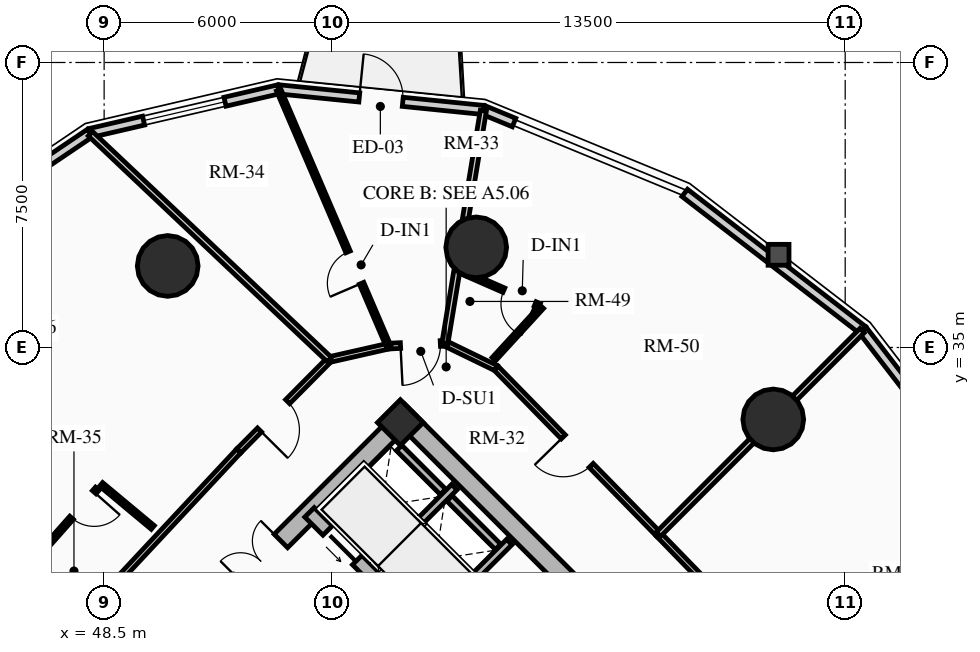
"""IFC4 building model, lengths in metres.
Left out: names, types, materials, properties, quantities, classifications, styles, units other than length and angle.
Written with IfcOpenShell. Run it as: python <this file> out.ifc"""

import sys

from ifc_helpers import new_model, si_unit, direction, frame, frame_2d, origin, origin_2d, place, context, subcontext, project, spatial, rectangle, circle, extrude, source, transform, mapped, element, fill, save


model = new_model("IFC4")
c1 = context("Model", 3, precision=1e-05, world=origin(), true_north=direction((0.0, 1.0)))
c2 = subcontext(c1, "Body", "Model", "MODEL_VIEW")
j1 = project(units=[si_unit("LENGTHUNIT", "METRE"), si_unit("PLANEANGLEUNIT", "RADIAN")], contexts=[c1])
p1 = place(None, origin())
s1 = spatial("IfcSite", under=j1, at=p1, CompositionType="ELEMENT")
p2 = place(p1, origin())
s2 = spatial("IfcBuilding", under=s1, at=p2, CompositionType="ELEMENT")
p3 = place(p2, frame((0.0, 0.0, 33.64)))
s3 = spatial("IfcBuildingStorey", under=s2, at=p3, CompositionType="ELEMENT", Elevation=33.64)
p4 = place(p3, frame((66.339, 23.227, 0.0), z_axis=(0.0, 0.0, 1.0), x_axis=(-0.707106781187, 0.707106781187, 0.0)))
e1 = element("IfcWall", 1, at=p4, inside=s3, PredefinedType="SHEAR", context=c2, shape_type="SweptSolid", body=[
    extrude(rectangle(XDim=14.3, YDim=0.5, at=frame_2d((7.15, 0.0))), origin(), (0.0, 0.0, 1.0), 2.91),
])
p5 = place(p3, frame((48.838, 25.596, 0.0), z_axis=(0.0, 0.0, 1.0), x_axis=(0.707106781187, 0.707106781187, 0.0)))
e2 = element("IfcWall", 2, at=p5, inside=s3, PredefinedType="SHEAR", context=c2, shape_type="SweptSolid", body=[
    extrude(rectangle(XDim=10.7, YDim=0.5, at=frame_2d((5.35, 0.0))), origin(), (0.0, 0.0, 1.0), 2.91),
])
m1 = source(origin(), c2, "Body", "SweptSolid", [
    extrude(rectangle(XDim=1.5, YDim=2.02, at=frame_2d((0.75, 1.01))), frame((0.0, 0.26, 0.0), z_axis=(0.0, -1.0, 0.0), x_axis=(1.0, 0.0, 0.0)), (0.0, 0.0, 1.0), 0.52),
])
p6 = place(p5, frame((4.6, 0.0, 0.0)))
e3 = element("IfcOpeningElement", 3, at=p6, cuts=e2, PredefinedType="OPENING", context=c2, shape_type="MappedRepresentation", body=[
    mapped(m1, transform((0.0, 0.0, 0.0), x_axis=(1.0, 0.0, 0.0), y_axis=(0.0, 1.0, 0.0), z_axis=(0.0, 0.0, 1.0), scale=1.0)),
])
p7 = place(p3, frame((63.662, 20.904, 0.0), z_axis=(0.0, 0.0, 1.0), x_axis=(-0.707106781187, 0.707106781187, 0.0)))
e4 = element("IfcWall", 4, at=p7, inside=s3, PredefinedType="SHEAR", context=c2, shape_type="SweptSolid", body=[
    extrude(rectangle(XDim=13.8, YDim=0.35, at=frame_2d((6.9, 0.0))), origin(), (0.0, 0.0, 1.0), 2.91),
])
m2 = source(origin(), c2, "Body", "SweptSolid", [
    extrude(rectangle(XDim=1.1, YDim=2.015, at=frame_2d((0.55, 1.007))), frame((0.0, 0.185, 0.0), z_axis=(0.0, -1.0, 0.0), x_axis=(1.0, 0.0, 0.0)), (0.0, 0.0, 1.0), 0.37),
])
p8 = place(p7, frame((10.025, 0.0, 0.0)))
e5 = element("IfcOpeningElement", 5, at=p8, cuts=e4, PredefinedType="OPENING", context=c2, shape_type="MappedRepresentation", body=[
    mapped(m2, transform((0.0, 0.0, 0.0), x_axis=(1.0, 0.0, 0.0), y_axis=(0.0, 1.0, 0.0), z_axis=(0.0, 0.0, 1.0), scale=1.0)),
])
p9 = place(p7, frame((12.025, 0.0, 0.0)))
e6 = element("IfcOpeningElement", 6, at=p9, cuts=e4, PredefinedType="OPENING", context=c2, shape_type="MappedRepresentation", body=[
    mapped(m2, transform((0.0, 0.0, 0.0), x_axis=(1.0, 0.0, 0.0), y_axis=(0.0, 1.0, 0.0), z_axis=(0.0, 0.0, 1.0), scale=1.0)),
])
m3 = source(origin(), c2, "Body", "SweptSolid", [
    extrude(rectangle(XDim=1.15, YDim=2.02, at=frame_2d((0.575, 1.01))), frame((0.0, 0.185, 0.0), z_axis=(0.0, -1.0, 0.0), x_axis=(1.0, 0.0, 0.0)), (0.0, 0.0, 1.0), 0.37),
])
p10 = place(p7, frame((5.33, 0.0, 0.0)))
e7 = element("IfcOpeningElement", 7, at=p10, cuts=e4, PredefinedType="OPENING", context=c2, shape_type="MappedRepresentation", body=[
    mapped(m3, transform((0.0, 0.0, 0.0), x_axis=(1.0, 0.0, 0.0), y_axis=(0.0, 1.0, 0.0), z_axis=(0.0, 0.0, 1.0), scale=1.0)),
])
p11 = place(p3, frame((56.294, 33.024, 0.0), z_axis=(0.0, 0.0, 1.0), x_axis=(0.707106781187, 0.707106781187, 0.0)))
e8 = element("IfcColumn", 8, at=p11, inside=s3, PredefinedType="COLUMN", context=c2, shape_type="SweptSolid", body=[
    extrude(rectangle(XDim=0.85, YDim=0.85, at=origin_2d()), origin(), (0.0, 0.0, 1.0), 2.91),
])
for number, where, z_axis, x_axis in (
    (9, (66.107, 33.107, 0.0), (0.0, 0.0, 1.0), (1.0, 0.0, 0.0)),
    (10, (58.291, 37.635, 0.0), (0.0, 0.0, 1.0), (1.0, 0.0, 0.0)),
    (11, (50.173, 37.146, 0.0), (0.0, 0.0, 1.0), (1.0, 0.0, 0.0)),
):
    element("IfcColumn", number, at=place(p3, frame(where, z_axis=z_axis, x_axis=x_axis)), inside=s3, PredefinedType="USERDEFINED", context=c2, shape_type="SweptSolid", body=[
        extrude(circle(Radius=0.8, at=origin_2d()), origin(), (0.0, 0.0, 1.0), 2.91),
    ])
p12 = place(p3, frame((63.778, 39.068, 0.0), z_axis=(0.0, 0.0, 1.0), x_axis=(0.792020182601, -0.610494906082, 0.0)))
e12 = element("IfcWall", 12, at=p12, inside=s3, PredefinedType="SOLIDWALL", context=c2, shape_type="SweptSolid", body=[
    extrude(rectangle(XDim=5.911, YDim=0.24, at=frame_2d((2.956, 0.0))), origin(), (0.0, 0.0, 1.0), 2.073),
])
p13 = place(p3, frame((58.482, 41.251, 0.0), z_axis=(0.0, 0.0, 1.0), x_axis=(0.924556017656, -0.381046152345, 0.0)))
e13 = element("IfcWall", 13, at=p13, inside=s3, PredefinedType="SOLIDWALL", context=c2, shape_type="SweptSolid", body=[
    extrude(rectangle(XDim=0.87, YDim=0.24, at=frame_2d((0.435, 0.0))), origin(), (0.0, 0.0, 1.0), 2.073),
])
p14 = place(p3, frame((53.09, 41.794, 0.0), z_axis=(0.0, 0.0, 1.0), x_axis=(0.994968263437, -0.100190592135, 0.0)))
e14 = element("IfcWall", 14, at=p14, inside=s3, PredefinedType="SOLIDWALL", context=c2, shape_type="SweptSolid", body=[
    extrude(rectangle(XDim=5.419, YDim=0.24, at=frame_2d((2.71, 0.0))), origin(), (0.0, 0.0, 1.0), 2.073),
])
m4 = source(origin(), c2, "Body", "SweptSolid", [
    extrude(rectangle(XDim=1.15, YDim=2.005, at=frame_2d((0.575, 1.002))), frame((0.0, 0.13, 0.0), z_axis=(0.0, -1.0, 0.0), x_axis=(1.0, 0.0, 0.0)), (0.0, 0.0, 1.0), 0.26),
])
p15 = place(p14, frame((2.135, 0.0, 0.0)))
e15 = element("IfcOpeningElement", 15, at=p15, cuts=e14, PredefinedType="OPENING", context=c2, shape_type="MappedRepresentation", body=[
    mapped(m4, transform((0.0, 0.0, 0.0), x_axis=(1.0, 0.0, 0.0), y_axis=(0.0, 1.0, 0.0), z_axis=(0.0, 0.0, 1.0), scale=1.0)),
])
p16 = place(p3, frame((48.129, 40.644, 0.0), z_axis=(0.0, 0.0, 1.0), x_axis=(0.974167686491, 0.22582585901, 0.0)))
e16 = element("IfcWall", 16, at=p16, inside=s3, PredefinedType="SOLIDWALL", context=c2, shape_type="SweptSolid", body=[
    extrude(rectangle(XDim=5.092, YDim=0.24, at=frame_2d((2.546, 0.0))), origin(), (0.0, 0.0, 1.0), 2.073),
])
m5 = source(origin(), c2, "Body", "SweptSolid", [
    extrude(rectangle(XDim=2.2, YDim=1.35, at=frame_2d((1.1, 0.675))), frame((0.0, 0.13, 0.0), z_axis=(0.0, -1.0, 0.0), x_axis=(1.0, 0.0, 0.0)), (0.0, 0.0, 1.0), 0.26),
])
p17 = place(p16, frame((1.446, 0.0, 0.65)))
e17 = element("IfcOpeningElement", 17, at=p17, cuts=e16, PredefinedType="OPENING", context=c2, shape_type="MappedRepresentation", body=[
    mapped(m5, transform((0.0, 0.0, 0.0), x_axis=(1.0, 0.0, 0.0), y_axis=(0.0, 1.0, 0.0), z_axis=(0.0, 0.0, 1.0), scale=1.0)),
])
p18 = place(p3, frame((44.086, 37.914, 0.0), z_axis=(0.0, 0.0, 1.0), x_axis=(0.828748297084, 0.559621532896, 0.0)))
e18 = element("IfcWall", 18, at=p18, inside=s3, PredefinedType="SOLIDWALL", context=c2, shape_type="SweptSolid", body=[
    extrude(rectangle(XDim=4.879, YDim=0.24, at=frame_2d((2.439, 0.0))), origin(), (0.0, 0.0, 1.0), 2.073),
])
p19 = place(p3, frame((68.459, 35.459, 0.0), z_axis=(0.0, 0.0, 1.0), x_axis=(0.610494906082, -0.792020182601, 0.0)))
e19 = element("IfcWall", 19, at=p19, inside=s3, PredefinedType="SOLIDWALL", context=c2, shape_type="SweptSolid", body=[
    extrude(rectangle(XDim=5.911, YDim=0.24, at=frame_2d((2.956, 0.0))), origin(), (0.0, 0.0, 1.0), 2.073),
])
m6 = source(origin(), c2, "Body", "SweptSolid", [
    extrude(rectangle(XDim=1.9, YDim=1.35, at=frame_2d((0.95, 0.675))), frame((0.0, 0.13, 0.0), z_axis=(0.0, -1.0, 0.0), x_axis=(1.0, 0.0, 0.0)), (0.0, 0.0, 1.0), 0.26),
])
p20 = place(p19, frame((2.005, 0.0, 0.65)))
e20 = element("IfcOpeningElement", 20, at=p20, cuts=e19, PredefinedType="OPENING", context=c2, shape_type="MappedRepresentation", body=[
    mapped(m6, transform((0.0, 0.0, 0.0), x_axis=(1.0, 0.0, 0.0), y_axis=(0.0, 1.0, 0.0), z_axis=(0.0, 0.0, 1.0), scale=1.0)),
])
p21 = place(p3, frame((57.062, 27.781, 0.0), z_axis=(0.0, 0.0, 1.0), x_axis=(0.707106781187, 0.707106781187, 0.0)))
e21 = element("IfcWall", 21, at=p21, inside=s3, PredefinedType="SHEAR", context=c2, shape_type="SweptSolid", body=[
    extrude(rectangle(XDim=2.97, YDim=0.2, at=frame_2d((1.485, 0.0))), origin(), (0.0, 0.0, 1.0), 2.91),
])
p22 = place(p3, frame((55.615, 29.227, 0.0), z_axis=(0.0, 0.0, 1.0), x_axis=(0.707147878904, 0.70706568108, 0.0)))
e22 = element("IfcWall", 22, at=p22, inside=s3, PredefinedType="SHEAR", context=c2, shape_type="SweptSolid", body=[
    extrude(rectangle(XDim=2.97, YDim=0.2, at=frame_2d((1.485, 0.0))), origin(), (0.0, 0.0, 1.0), 2.91),
])
p23 = place(p3, frame((58.865, 29.754, 0.0), z_axis=(0.0, 0.0, 1.0), x_axis=(-0.707174411312, 0.707039144592, 0.0)))
e23 = element("IfcWall", 23, at=p23, inside=s3, PredefinedType="SHEAR", context=c2, shape_type="SweptSolid", body=[
    extrude(rectangle(XDim=1.805, YDim=0.2, at=frame_2d((0.902, 0.0))), origin(), (0.0, 0.0, 1.0), 2.91),
])
p24 = place(p3, frame((57.419, 31.2, 0.0), z_axis=(0.0, 0.0, 1.0), x_axis=(-0.707032117043, 0.707181437447, 0.0)))
e24 = element("IfcWall", 24, at=p24, inside=s3, PredefinedType="SHEAR", context=c2, shape_type="SweptSolid", body=[
    extrude(rectangle(XDim=1.635, YDim=0.2, at=frame_2d((0.817, 0.0))), origin(), (0.0, 0.0, 1.0), 2.91),
])
p25 = place(p3, frame((63.086, 30.086, 0.0), z_axis=(0.0, 0.0, 1.0), x_axis=(-0.699075897379, 0.715047473741, 0.0)))
e25 = element("IfcWall", 25, at=p25, inside=s3, PredefinedType="PARTITIONING", context=c2, shape_type="SweptSolid", body=[
    extrude(rectangle(XDim=6.114, YDim=0.15, at=frame_2d((3.057, 0.0))), origin(), (0.0, 0.0, 1.0), 2.159),
])
m7 = source(origin(), c2, "Body", "SweptSolid", [
    extrude(rectangle(XDim=1.05, YDim=2.015, at=frame_2d((0.525, 1.007))), frame((0.0, 0.085, 0.0), z_axis=(0.0, -1.0, 0.0), x_axis=(1.0, 0.0, 0.0)), (0.0, 0.0, 1.0), 0.17),
])
p26 = place(p25, frame((2.532, 0.0, 0.0)))
e26 = element("IfcOpeningElement", 26, at=p26, cuts=e25, PredefinedType="OPENING", context=c2, shape_type="MappedRepresentation", body=[
    mapped(m7, transform((0.0, 0.0, 0.0), x_axis=(1.0, 0.0, 0.0), y_axis=(0.0, 1.0, 0.0), z_axis=(0.0, 0.0, 1.0), scale=1.0)),
])
p27 = place(p3, frame((58.812, 34.458, 0.0), z_axis=(0.0, 0.0, 1.0), x_axis=(-0.899559490277, 0.436798264021, 0.0)))
e27 = element("IfcWall", 27, at=p27, inside=s3, PredefinedType="PARTITIONING", context=c2, shape_type="SweptSolid", body=[
    extrude(rectangle(XDim=1.495, YDim=0.15, at=frame_2d((0.748, 0.0))), origin(), (0.0, 0.0, 1.0), 2.205),
])
p28 = place(p3, frame((57.467, 35.111, 0.0), z_axis=(0.0, 0.0, 1.0), x_axis=(-0.998691757323, -0.051134859488, 0.0)))
e28 = element("IfcWall", 28, at=p28, inside=s3, PredefinedType="PARTITIONING", context=c2, shape_type="SweptSolid", body=[
    extrude(rectangle(XDim=1.485, YDim=0.15, at=frame_2d((0.742, 0.0))), origin(), (0.0, 0.0, 1.0), 2.159),
])
p29 = place(p28, frame((0.12, 0.0, 0.0)))
e29 = element("IfcOpeningElement", 29, at=p29, cuts=e28, PredefinedType="OPENING", context=c2, shape_type="MappedRepresentation", body=[
    mapped(m7, transform((0.0, 0.0, 0.0), x_axis=(1.0, 0.0, 0.0), y_axis=(0.0, 1.0, 0.0), z_axis=(0.0, 0.0, 1.0), scale=1.0)),
])
p30 = place(p3, frame((55.984, 35.035, 0.0), z_axis=(0.0, 0.0, 1.0), x_axis=(-0.975290305708, -0.22092718165, 0.0)))
e30 = element("IfcWall", 30, at=p30, inside=s3, PredefinedType="PARTITIONING", context=c2, shape_type="SweptSolid", body=[
    extrude(rectangle(XDim=1.597, YDim=0.15, at=frame_2d((0.798, 0.0))), origin(), (0.0, 0.0, 1.0), 2.205),
])
p31 = place(p3, frame((54.427, 34.683, 0.0), z_axis=(0.0, 0.0, 1.0), x_axis=(-0.704178989986, -0.710022499687, 0.0)))
e31 = element("IfcWall", 31, at=p31, inside=s3, PredefinedType="PARTITIONING", context=c2, shape_type="SweptSolid", body=[
    extrude(rectangle(XDim=3.384, YDim=0.15, at=frame_2d((1.692, 0.0))), origin(), (0.0, 0.0, 1.0), 2.159),
])
p32 = place(p31, frame((1.56, 0.0, 0.0)))
e32 = element("IfcOpeningElement", 32, at=p32, cuts=e31, PredefinedType="OPENING", context=c2, shape_type="MappedRepresentation", body=[
    mapped(m7, transform((0.0, 0.0, 0.0), x_axis=(1.0, 0.0, 0.0), y_axis=(0.0, 1.0, 0.0), z_axis=(0.0, 0.0, 1.0), scale=1.0)),
])
p33 = place(p3, frame((52.043, 32.28, 0.0), z_axis=(0.0, 0.0, 1.0), x_axis=(-0.682606081633, -0.730786519661, 0.0)))
e33 = element("IfcWall", 33, at=p33, inside=s3, PredefinedType="PARTITIONING", context=c2, shape_type="SweptSolid", body=[
    extrude(rectangle(XDim=6.527, YDim=0.15, at=frame_2d((3.263, 0.0))), origin(), (0.0, 0.0, 1.0), 2.159),
])
p34 = place(p3, frame((67.27, 25.78, 0.0), z_axis=(0.0, 0.0, 1.0), x_axis=(-0.696847842907, 0.717218992942, 0.0)))
e34 = element("IfcWall", 34, at=p34, inside=s3, PredefinedType="PARTITIONING", context=c2, shape_type="SweptSolid", body=[
    extrude(rectangle(XDim=6.004, YDim=0.15, at=frame_2d((3.002, 0.0))), origin(), (0.0, 0.0, 1.0), 2.635),
])
m8 = source(origin(), c2, "Body", "SweptSolid", [
    extrude(rectangle(XDim=1.0, YDim=2.015, at=frame_2d((0.5, 1.007))), frame((0.0, 0.085, 0.0), z_axis=(0.0, -1.0, 0.0), x_axis=(1.0, 0.0, 0.0)), (0.0, 0.0, 1.0), 0.17),
])
p35 = place(p34, frame((2.502, 0.0, 0.0)))
e35 = element("IfcOpeningElement", 35, at=p35, cuts=e34, PredefinedType="OPENING", context=c2, shape_type="MappedRepresentation", body=[
    mapped(m8, transform((0.0, 0.0, 0.0), x_axis=(1.0, 0.0, 0.0), y_axis=(0.0, 1.0, 0.0), z_axis=(0.0, 0.0, 1.0), scale=1.0)),
])
p36 = place(p3, frame((63.086, 30.086, 0.0), z_axis=(0.0, 0.0, 1.0), x_axis=(0.707106781187, 0.707106781187, 0.0)))
e36 = element("IfcWall", 36, at=p36, inside=s3, PredefinedType="PARTITIONING", context=c2, shape_type="SweptSolid", body=[
    extrude(rectangle(XDim=7.579, YDim=0.16, at=frame_2d((3.79, 0.0))), origin(), (0.0, 0.0, 1.0), 2.073),
])
p37 = place(p3, frame((57.467, 35.111, 0.0), z_axis=(0.0, 0.0, 1.0), x_axis=(0.163141505202, 0.986602680556, 0.0)))
e37 = element("IfcWall", 37, at=p37, inside=s3, PredefinedType="PARTITIONING", context=c2, shape_type="SweptSolid", body=[
    extrude(rectangle(XDim=6.203, YDim=0.16, at=frame_2d((3.102, 0.0))), origin(), (0.0, 0.0, 1.0), 2.073),
])
p38 = place(p3, frame((54.427, 34.683, 0.0), z_axis=(0.0, 0.0, 1.0), x_axis=(-0.726732956694, 0.686920089716, 0.0)))
e38 = element("IfcWall", 38, at=p38, inside=s3, PredefinedType="PARTITIONING", context=c2, shape_type="SweptSolid", body=[
    extrude(rectangle(XDim=8.653, YDim=0.16, at=frame_2d((4.326, 0.0))), origin(), (0.0, 0.0, 1.0), 2.073),
])
p39 = place(p3, frame((47.588, 27.51, 0.0), z_axis=(0.0, 0.0, 1.0), x_axis=(-0.699371977892, 0.714757886657, 0.0)))
e39 = element("IfcWall", 39, at=p39, inside=s3, PredefinedType="PARTITIONING", context=c2, shape_type="SweptSolid", body=[
    extrude(rectangle(XDim=8.886, YDim=0.16, at=frame_2d((4.443, 0.0))), origin(), (0.0, 0.0, 1.0), 2.073),
])
p40 = place(p3, frame((55.984, 35.035, 0.0), z_axis=(0.0, 0.0, 1.0), x_axis=(-0.394244760106, 0.919005478291, 0.0)))
e40 = element("IfcWall", 40, at=p40, inside=s3, PredefinedType="PARTITIONING", context=c2, shape_type="SweptSolid", body=[
    extrude(rectangle(XDim=7.333, YDim=0.125, at=frame_2d((3.667, 0.0))), origin(), (0.0, 0.0, 1.0), 2.073),
])
m9 = source(origin(), c2, "Body", "SweptSolid", [
    extrude(rectangle(XDim=0.9, YDim=2.005, at=frame_2d((0.45, 1.002))), frame((0.0, 0.073, 0.0), z_axis=(0.0, -1.0, 0.0), x_axis=(1.0, 0.0, 0.0)), (0.0, 0.0, 1.0), 0.145),
])
p41 = place(p40, frame((1.8, 0.0, 0.0)))
e41 = element("IfcOpeningElement", 41, at=p41, cuts=e40, PredefinedType="OPENING", context=c2, shape_type="MappedRepresentation", body=[
    mapped(m9, transform((0.0, 0.0, 0.0), x_axis=(1.0, 0.0, 0.0), y_axis=(0.0, 1.0, 0.0), z_axis=(0.0, 0.0, 1.0), scale=1.0)),
])
p42 = place(p3, frame((49.78, 30.264, 0.0), z_axis=(0.0, 0.0, 1.0), x_axis=(-0.768209972595, 0.640197967824, 0.0)))
e42 = element("IfcWall", 42, at=p42, inside=s3, PredefinedType="PARTITIONING", context=c2, shape_type="SweptSolid", body=[
    extrude(rectangle(XDim=1.77, YDim=0.125, at=frame_2d((0.885, 0.0))), origin(), (0.0, 0.0, 1.0), 2.635),
])
p43 = place(p3, frame((48.318, 31.282, 0.0), z_axis=(0.0, 0.0, 1.0), x_axis=(-0.662365127428, -0.749181178333, 0.0)))
e43 = element("IfcWall", 43, at=p43, inside=s3, PredefinedType="PARTITIONING", context=c2, shape_type="SweptSolid", body=[
    extrude(rectangle(XDim=2.953, YDim=0.125, at=frame_2d((1.477, 0.0))), origin(), (0.0, 0.0, 1.0), 2.159),
])
p44 = place(p43, frame((0.12, 0.0, 0.0)))
e44 = element("IfcOpeningElement", 44, at=p44, cuts=e43, PredefinedType="OPENING", context=c2, shape_type="MappedRepresentation", body=[
    mapped(m9, transform((0.0, 0.0, 0.0), x_axis=(1.0, 0.0, 0.0), y_axis=(0.0, 1.0, 0.0), z_axis=(0.0, 0.0, 1.0), scale=1.0)),
])
p45 = place(p3, frame((58.756, 34.694, 0.0), z_axis=(0.0, 0.0, 1.0), x_axis=(0.675641726749, 0.73723012491, 0.0)))
e45 = element("IfcWall", 45, at=p45, inside=s3, PredefinedType="PARTITIONING", context=c2, shape_type="SweptSolid", body=[
    extrude(rectangle(XDim=1.867, YDim=0.125, at=frame_2d((0.934, 0.0))), origin(), (0.0, 0.0, 1.0), 2.205),
])
p46 = place(p3, frame((59.952, 36.099, 0.0), z_axis=(0.0, 0.0, 1.0), x_axis=(-0.915914750605, 0.401372856113, 0.0)))
e46 = element("IfcWall", 46, at=p46, inside=s3, PredefinedType="PARTITIONING", context=c2, shape_type="SweptSolid", body=[
    extrude(rectangle(XDim=2.265, YDim=0.125, at=frame_2d((1.133, 0.0))), origin(), (0.0, 0.0, 1.0), 2.159),
])
p47 = place(p46, frame((0.12, 0.0, 0.0)))
e47 = element("IfcOpeningElement", 47, at=p47, cuts=e46, PredefinedType="OPENING", context=c2, shape_type="MappedRepresentation", body=[
    mapped(m9, transform((0.0, 0.0, 0.0), x_axis=(1.0, 0.0, 0.0), y_axis=(0.0, 1.0, 0.0), z_axis=(0.0, 0.0, 1.0), scale=1.0)),
])
m10 = source(origin(), c2, "Body", "SweptSolid", [
    extrude(rectangle(XDim=1.15, YDim=2.005, at=frame_2d((0.575, 1.002))), frame((0.0, 0.025, 0.0), z_axis=(0.0, -1.0, 0.0), x_axis=(1.0, 0.0, 0.0)), (0.0, 0.0, 1.0), 0.05),
])
p48 = place(p15, origin())
e48 = element("IfcDoor", 48, at=p48, inside=s3, OperationType="SINGLE_SWING_LEFT", PredefinedType="DOOR", context=c2, shape_type="MappedRepresentation", body=[
    mapped(m10, transform((0.0, 0.0, 0.0), x_axis=(1.0, 0.0, 0.0), y_axis=(0.0, 1.0, 0.0), z_axis=(0.0, 0.0, 1.0), scale=1.0)),
])
fill(e15, e48)
m11 = source(origin(), c2, "Body", "SweptSolid", [
    extrude(rectangle(XDim=2.2, YDim=1.35, at=frame_2d((1.1, 0.675))), frame((0.0, 0.03, 0.0), z_axis=(0.0, -1.0, 0.0), x_axis=(1.0, 0.0, 0.0)), (0.0, 0.0, 1.0), 0.06),
])
p49 = place(p17, origin())
e49 = element("IfcWindow", 49, at=p49, inside=s3, PartitioningType="DOUBLE_PANEL_VERTICAL", PredefinedType="WINDOW", context=c2, shape_type="MappedRepresentation", body=[
    mapped(m11, transform((0.0, 0.0, 0.0), x_axis=(1.0, 0.0, 0.0), y_axis=(0.0, 1.0, 0.0), z_axis=(0.0, 0.0, 1.0), scale=1.0)),
])
fill(e17, e49)
m12 = source(origin(), c2, "Body", "SweptSolid", [
    extrude(rectangle(XDim=1.1, YDim=2.015, at=frame_2d((0.55, 1.007))), frame((0.0, 0.025, 0.0), z_axis=(0.0, -1.0, 0.0), x_axis=(1.0, 0.0, 0.0)), (0.0, 0.0, 1.0), 0.05),
])
p50 = place(p9, origin())
e50 = element("IfcDoor", 50, at=p50, inside=s3, OperationType="SLIDING_TO_LEFT", PredefinedType="DOOR", context=c2, shape_type="MappedRepresentation", body=[
    mapped(m12, transform((0.0, 0.0, 0.0), x_axis=(1.0, 0.0, 0.0), y_axis=(0.0, 1.0, 0.0), z_axis=(0.0, 0.0, 1.0), scale=1.0)),
])
fill(e6, e50)
m13 = source(origin(), c2, "Body", "SweptSolid", [
    extrude(rectangle(XDim=1.5, YDim=2.02, at=frame_2d((0.75, 1.01))), frame((0.0, 0.025, 0.0), z_axis=(0.0, -1.0, 0.0), x_axis=(1.0, 0.0, 0.0)), (0.0, 0.0, 1.0), 0.05),
])
p51 = place(p6, origin())
e51 = element("IfcDoor", 51, at=p51, inside=s3, OperationType="DOUBLE_DOOR_SINGLE_SWING", PredefinedType="DOOR", context=c2, shape_type="MappedRepresentation", body=[
    mapped(m13, transform((0.0, 0.0, 0.0), x_axis=(1.0, 0.0, 0.0), y_axis=(0.0, 1.0, 0.0), z_axis=(0.0, 0.0, 1.0), scale=1.0)),
])
fill(e3, e51)
m14 = source(origin(), c2, "Body", "SweptSolid", [
    extrude(rectangle(XDim=1.05, YDim=2.015, at=frame_2d((0.525, 1.007))), frame((0.0, 0.025, 0.0), z_axis=(0.0, -1.0, 0.0), x_axis=(1.0, 0.0, 0.0)), (0.0, 0.0, 1.0), 0.05),
])
p52 = place(p29, origin())
e52 = element("IfcDoor", 52, at=p52, inside=s3, OperationType="SINGLE_SWING_RIGHT", PredefinedType="DOOR", context=c2, shape_type="MappedRepresentation", body=[
    mapped(m14, transform((0.0, 0.0, 0.0), x_axis=(1.0, 0.0, 0.0), y_axis=(0.0, 1.0, 0.0), z_axis=(0.0, 0.0, 1.0), scale=1.0)),
])
fill(e29, e52)
m15 = source(origin(), c2, "Body", "SweptSolid", [
    extrude(rectangle(XDim=0.9, YDim=2.005, at=frame_2d((0.45, 1.002))), frame((0.0, 0.025, 0.0), z_axis=(0.0, -1.0, 0.0), x_axis=(1.0, 0.0, 0.0)), (0.0, 0.0, 1.0), 0.05),
])
p53 = place(p41, origin())
e53 = element("IfcDoor", 53, at=p53, inside=s3, OperationType="SINGLE_SWING_LEFT", PredefinedType="DOOR", context=c2, shape_type="MappedRepresentation", body=[
    mapped(m15, transform((0.0, 0.0, 0.0), x_axis=(1.0, 0.0, 0.0), y_axis=(0.0, 1.0, 0.0), z_axis=(0.0, 0.0, 1.0), scale=1.0)),
])
fill(e41, e53)
p54 = place(p32, origin())
e54 = element("IfcDoor", 54, at=p54, inside=s3, OperationType="SINGLE_SWING_RIGHT", PredefinedType="DOOR", context=c2, shape_type="MappedRepresentation", body=[
    mapped(m14, transform((0.0, 0.0, 0.0), x_axis=(1.0, 0.0, 0.0), y_axis=(0.0, 1.0, 0.0), z_axis=(0.0, 0.0, 1.0), scale=1.0)),
])
fill(e32, e54)
p55 = place(p44, origin())
e55 = element("IfcDoor", 55, at=p55, inside=s3, OperationType="SINGLE_SWING_LEFT", PredefinedType="DOOR", context=c2, shape_type="MappedRepresentation", body=[
    mapped(m15, transform((0.0, 0.0, 0.0), x_axis=(1.0, 0.0, 0.0), y_axis=(0.0, 1.0, 0.0), z_axis=(0.0, 0.0, 1.0), scale=1.0)),
])
fill(e44, e55)
p56 = place(p26, origin())
e56 = element("IfcDoor", 56, at=p56, inside=s3, OperationType="SINGLE_SWING_RIGHT", PredefinedType="DOOR", context=c2, shape_type="MappedRepresentation", body=[
    mapped(m14, transform((0.0, 0.0, 0.0), x_axis=(1.0, 0.0, 0.0), y_axis=(0.0, 1.0, 0.0), z_axis=(0.0, 0.0, 1.0), scale=1.0)),
])
fill(e26, e56)
p57 = place(p47, origin())
e57 = element("IfcDoor", 57, at=p57, inside=s3, OperationType="SINGLE_SWING_LEFT", PredefinedType="DOOR", context=c2, shape_type="MappedRepresentation", body=[
    mapped(m15, transform((0.0, 0.0, 0.0), x_axis=(1.0, 0.0, 0.0), y_axis=(0.0, 1.0, 0.0), z_axis=(0.0, 0.0, 1.0), scale=1.0)),
])
fill(e47, e57)
save(model, sys.argv[1])
